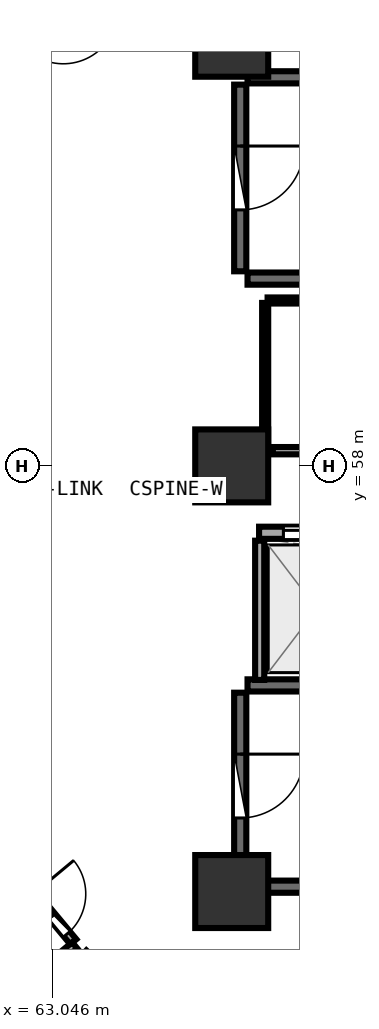
"""IFC4 building model, lengths in metres.
Left out: names, types, materials, properties, quantities, classifications, styles, units other than length and angle.
Written with IfcOpenShell. Run it as: python <this file> out.ifc"""

import sys

from ifc_helpers import new_model, si_unit, direction, frame, frame_2d, origin, origin_2d, place, context, subcontext, project, spatial, rectangle, extrude, element, fill, save


model = new_model("IFC4")
c1 = context("Model", 3, precision=1e-05, world=origin(), true_north=direction((0.0, 1.0)))
c2 = subcontext(c1, "Body", "Model", "MODEL_VIEW")
j1 = project(units=[si_unit("LENGTHUNIT", "METRE"), si_unit("PLANEANGLEUNIT", "RADIAN")], contexts=[c1])
p1 = place(None, origin())
s1 = spatial("IfcSite", under=j1, at=p1, CompositionType="ELEMENT")
p2 = place(p1, origin())
s2 = spatial("IfcBuilding", under=s1, at=p2, CompositionType="ELEMENT")
p3 = place(p2, frame((0.0, 0.0, 200.7)))
s3 = spatial("IfcBuildingStorey", under=s2, at=p3, CompositionType="ELEMENT", Elevation=200.7)
for number, where, z_axis, x_axis in (
    (1, (66.0, 51.0, 0.0), (0.0, 0.0, 1.0), (1.0, 0.0, 0.0)),
    (2, (66.0, 65.0, 0.0), (0.0, 0.0, 1.0), (1.0, 0.0, 0.0)),
    (3, (66.0, 58.0, 0.0), (0.0, 0.0, 1.0), (1.0, 0.0, 0.0)),
):
    element("IfcColumn", number, at=place(p3, frame(where, z_axis=z_axis, x_axis=x_axis)), inside=s3, PredefinedType="PILASTER", context=c2, shape_type="SweptSolid", body=[
        extrude(rectangle(XDim=1.2, YDim=1.2, at=origin_2d()), origin(), (0.0, 0.0, 1.0), 3.75),
    ])
for number, where, z_axis, x_axis in (
    (4, (66.26, 61.08, 0.0), (0.0, 0.0, 1.0), (1.0, 0.0, 0.0)),
    (5, (73.42, 64.39, 0.0), (0.0, 0.0, 1.0), (-1.0, 0.0, 0.0)),
):
    element("IfcWall", number, at=place(p3, frame(where, z_axis=z_axis, x_axis=x_axis)), inside=s3, PredefinedType="SHEAR", context=c2, shape_type="SweptSolid", body=[
        extrude(rectangle(XDim=7.16, YDim=0.2, at=frame_2d((3.58, 0.0))), origin(), (0.0, 0.0, 1.0), 3.49),
    ])
p4 = place(p3, frame((66.14, 64.27, 0.0), z_axis=(0.0, 0.0, 1.0), x_axis=(0.0, -1.0, 0.0)))
e6 = element("IfcWall", 6, at=p4, inside=s3, PredefinedType="SHEAR", context=c2, shape_type="SweptSolid", body=[
    extrude(rectangle(XDim=3.07, YDim=0.2, at=frame_2d((1.535, 0.0))), origin(), (0.0, 0.0, 1.0), 3.49),
])
p5 = place(p4, frame((1.01, 0.0, 0.0)))
e7 = element("IfcOpeningElement", 7, at=p5, cuts=e6, PredefinedType="OPENING", context=c2, shape_type="SweptSolid", body=[
    extrude(rectangle(XDim=1.05, YDim=2.1, at=frame_2d((0.525, 1.05))), frame((0.0, 0.11, 0.0), z_axis=(0.0, -1.0, 0.0), x_axis=(1.0, 0.0, 0.0)), (0.0, 0.0, 1.0), 0.22),
])
for number, where, z_axis, x_axis in (
    (8, (66.26, 51.08, 0.0), (0.0, 0.0, 1.0), (1.0, 0.0, 0.0)),
    (9, (73.42, 54.39, 0.0), (0.0, 0.0, 1.0), (-1.0, 0.0, 0.0)),
):
    element("IfcWall", number, at=place(p3, frame(where, z_axis=z_axis, x_axis=x_axis)), inside=s3, PredefinedType="SHEAR", context=c2, shape_type="SweptSolid", body=[
        extrude(rectangle(XDim=7.16, YDim=0.2, at=frame_2d((3.58, 0.0))), origin(), (0.0, 0.0, 1.0), 3.49),
    ])
p6 = place(p3, frame((66.14, 54.27, 0.0), z_axis=(0.0, 0.0, 1.0), x_axis=(0.0, -1.0, 0.0)))
e10 = element("IfcWall", 10, at=p6, inside=s3, PredefinedType="SHEAR", context=c2, shape_type="SweptSolid", body=[
    extrude(rectangle(XDim=3.07, YDim=0.2, at=frame_2d((1.535, 0.0))), origin(), (0.0, 0.0, 1.0), 3.49),
])
p7 = place(p6, frame((1.01, 0.0, 0.0)))
e11 = element("IfcOpeningElement", 11, at=p7, cuts=e10, PredefinedType="OPENING", context=c2, shape_type="SweptSolid", body=[
    extrude(rectangle(XDim=1.05, YDim=2.1, at=frame_2d((0.525, 1.05))), frame((0.0, 0.11, 0.0), z_axis=(0.0, -1.0, 0.0), x_axis=(1.0, 0.0, 0.0)), (0.0, 0.0, 1.0), 0.22),
])
p8 = place(p3, frame((66.45, 56.9, 0.0), z_axis=(0.0, 0.0, 1.0), x_axis=(1.0, 0.0, 0.0)))
e12 = element("IfcWall", 12, at=p8, inside=s3, PredefinedType="SOLIDWALL", context=c2, shape_type="SweptSolid", body=[
    extrude(rectangle(XDim=14.4, YDim=0.2, at=frame_2d((7.2, 0.0))), origin(), (0.0, 0.0, 1.0), 3.48),
])
p9 = place(p8, frame((0.4, 0.0, 0.0)))
e13 = element("IfcOpeningElement", 13, at=p9, cuts=e12, PredefinedType="OPENING", context=c2, shape_type="SweptSolid", body=[
    extrude(rectangle(XDim=1.1, YDim=2.1, at=frame_2d((0.55, 1.05))), frame((0.0, 0.11, 0.0), z_axis=(0.0, -1.0, 0.0), x_axis=(1.0, 0.0, 0.0)), (0.0, 0.0, 1.0), 0.22),
])
p10 = place(p8, frame((2.4, 0.0, 0.0)))
e14 = element("IfcOpeningElement", 14, at=p10, cuts=e12, PredefinedType="OPENING", context=c2, shape_type="SweptSolid", body=[
    extrude(rectangle(XDim=1.1, YDim=2.1, at=frame_2d((0.55, 1.05))), frame((0.0, 0.11, 0.0), z_axis=(0.0, -1.0, 0.0), x_axis=(1.0, 0.0, 0.0)), (0.0, 0.0, 1.0), 0.22),
])
p11 = place(p8, frame((4.4, 0.0, 0.0)))
e15 = element("IfcOpeningElement", 15, at=p11, cuts=e12, PredefinedType="OPENING", context=c2, shape_type="SweptSolid", body=[
    extrude(rectangle(XDim=1.1, YDim=2.1, at=frame_2d((0.55, 1.05))), frame((0.0, 0.11, 0.0), z_axis=(0.0, -1.0, 0.0), x_axis=(1.0, 0.0, 0.0)), (0.0, 0.0, 1.0), 0.22),
])
p12 = place(p3, frame((66.46, 54.48, 0.0), z_axis=(0.0, 0.0, 1.0), x_axis=(0.0, 1.0, 0.0)))
e16 = element("IfcWall", 16, at=p12, inside=s3, PredefinedType="PARTITIONING", context=c2, shape_type="SweptSolid", body=[
    extrude(rectangle(XDim=2.29, YDim=0.15, at=frame_2d((1.145, 0.0))), origin(), (0.0, 0.0, 1.0), 3.48),
])
p13 = place(p3, frame((66.675, 58.25, 0.0), z_axis=(0.0, 0.0, 1.0), x_axis=(1.0, 0.0, 0.0)))
e17 = element("IfcWall", 17, at=p13, inside=s3, PredefinedType="PARTITIONING", context=c2, shape_type="SweptSolid", body=[
    extrude(rectangle(XDim=3.265, YDim=0.12, at=frame_2d((1.632, 0.0))), origin(), (0.0, 0.0, 1.0), 3.48),
])
p14 = place(p13, frame((1.182, 0.0, 0.0)))
e18 = element("IfcOpeningElement", 18, at=p14, cuts=e17, PredefinedType="OPENING", context=c2, shape_type="SweptSolid", body=[
    extrude(rectangle(XDim=0.9, YDim=2.08, at=frame_2d((0.45, 1.04))), frame((0.0, 0.07, 0.0), z_axis=(0.0, -1.0, 0.0), x_axis=(1.0, 0.0, 0.0)), (0.0, 0.0, 1.0), 0.14),
])
p15 = place(p3, frame((63.885, 66.327, 0.0), z_axis=(0.0, 0.0, 1.0), x_axis=(-0.626276824741, -0.779600756023, 0.0)))
e19 = element("IfcWall", 19, at=p15, inside=s3, PredefinedType="PARTITIONING", context=c2, shape_type="SweptSolid", body=[
    extrude(rectangle(XDim=2.99, YDim=0.12, at=frame_2d((1.495, 0.0))), origin(), (0.0, 0.0, 1.0), 3.025),
])
p16 = place(p15, frame((1.045, 0.0, 0.0)))
e20 = element("IfcOpeningElement", 20, at=p16, cuts=e19, PredefinedType="OPENING", context=c2, shape_type="SweptSolid", body=[
    extrude(rectangle(XDim=0.9, YDim=2.08, at=frame_2d((0.45, 1.04))), frame((0.0, 0.07, 0.0), z_axis=(0.0, -1.0, 0.0), x_axis=(1.0, 0.0, 0.0)), (0.0, 0.0, 1.0), 0.14),
])
p17 = place(p3, frame((62.635, 51.086, 0.0), z_axis=(0.0, 0.0, 1.0), x_axis=(0.639759255057, -0.768575367526, 0.0)))
e21 = element("IfcWall", 21, at=p17, inside=s3, PredefinedType="PLUMBINGWALL", context=c2, shape_type="SweptSolid", body=[
    extrude(rectangle(XDim=1.187, YDim=0.13, at=frame_2d((0.593, 0.0))), origin(), (0.0, 0.0, 1.0), 3.025),
])
p18 = place(p17, frame((0.163, 0.0, 0.0)))
e22 = element("IfcOpeningElement", 22, at=p18, cuts=e21, PredefinedType="OPENING", context=c2, shape_type="SweptSolid", body=[
    extrude(rectangle(XDim=0.86, YDim=2.05, at=frame_2d((0.43, 1.025))), frame((0.0, 0.075, 0.0), z_axis=(0.0, -1.0, 0.0), x_axis=(1.0, 0.0, 0.0)), (0.0, 0.0, 1.0), 0.15),
])
p19 = place(p3, frame((69.96, 60.72, 0.0), z_axis=(0.0, 0.0, 1.0), x_axis=(-1.0, 0.0, 0.0)))
e23 = element("IfcWall", 23, at=p19, inside=s3, PredefinedType="PARTITIONING", context=c2, shape_type="SweptSolid", body=[
    extrude(rectangle(XDim=3.37, YDim=0.1, at=frame_2d((1.685, 0.0))), origin(), (0.0, 0.0, 1.0), 3.48),
])
p20 = place(p3, frame((66.55, 60.68, 0.0), z_axis=(0.0, 0.0, 1.0), x_axis=(0.0, -1.0, 0.0)))
e24 = element("IfcWall", 24, at=p20, inside=s3, PredefinedType="PARTITIONING", context=c2, shape_type="SweptSolid", body=[
    extrude(rectangle(XDim=2.383, YDim=0.1, at=frame_2d((1.191, 0.0))), origin(), (0.0, 0.0, 1.0), 3.48),
])
p21 = place(p3, frame((63.417, 50.115, 0.0), z_axis=(0.0, 0.0, 1.0), x_axis=(-0.76963081868, -0.638489156477, 0.0)))
e25 = element("IfcWall", 25, at=p21, inside=s3, PredefinedType="PLUMBINGWALL", context=c2, shape_type="SweptSolid", body=[
    extrude(rectangle(XDim=3.36, YDim=0.13, at=frame_2d((1.68, 0.0))), origin(), (0.0, 0.0, 1.0), 3.175),
])
p22 = place(p5, origin())
e26 = element("IfcDoor", 26, at=p22, inside=s3, OperationType="SINGLE_SWING_LEFT", PredefinedType="DOOR", context=c2, shape_type="SweptSolid", body=[
    extrude(rectangle(XDim=1.05, YDim=2.1, at=frame_2d((0.525, 1.05))), frame((0.0, 0.025, 0.0), z_axis=(0.0, -1.0, 0.0), x_axis=(1.0, 0.0, 0.0)), (0.0, 0.0, 1.0), 0.05),
])
fill(e7, e26)
p23 = place(p7, origin())
e27 = element("IfcDoor", 27, at=p23, inside=s3, OperationType="SINGLE_SWING_LEFT", PredefinedType="DOOR", context=c2, shape_type="SweptSolid", body=[
    extrude(rectangle(XDim=1.05, YDim=2.1, at=frame_2d((0.525, 1.05))), frame((0.0, 0.025, 0.0), z_axis=(0.0, -1.0, 0.0), x_axis=(1.0, 0.0, 0.0)), (0.0, 0.0, 1.0), 0.05),
])
fill(e11, e27)
p24 = place(p9, origin())
e28 = element("IfcDoor", 28, at=p24, inside=s3, OperationType="DOUBLE_DOOR_SLIDING", PredefinedType="DOOR", context=c2, shape_type="SweptSolid", body=[
    extrude(rectangle(XDim=1.1, YDim=2.1, at=frame_2d((0.55, 1.05))), frame((0.0, 0.025, 0.0), z_axis=(0.0, -1.0, 0.0), x_axis=(1.0, 0.0, 0.0)), (0.0, 0.0, 1.0), 0.05),
])
fill(e13, e28)
p25 = place(p16, origin())
e29 = element("IfcDoor", 29, at=p25, inside=s3, OperationType="SINGLE_SWING_LEFT", PredefinedType="DOOR", context=c2, shape_type="SweptSolid", body=[
    extrude(rectangle(XDim=0.9, YDim=2.08, at=frame_2d((0.45, 1.04))), frame((0.0, 0.025, 0.0), z_axis=(0.0, -1.0, 0.0), x_axis=(1.0, 0.0, 0.0)), (0.0, 0.0, 1.0), 0.05),
])
fill(e20, e29)
p26 = place(p18, origin())
e30 = element("IfcDoor", 30, at=p26, inside=s3, OperationType="SINGLE_SWING_LEFT", PredefinedType="DOOR", context=c2, shape_type="SweptSolid", body=[
    extrude(rectangle(XDim=0.86, YDim=2.05, at=frame_2d((0.43, 1.025))), frame((0.0, 0.025, 0.0), z_axis=(0.0, -1.0, 0.0), x_axis=(1.0, 0.0, 0.0)), (0.0, 0.0, 1.0), 0.05),
])
fill(e22, e30)
save(model, sys.argv[1])
